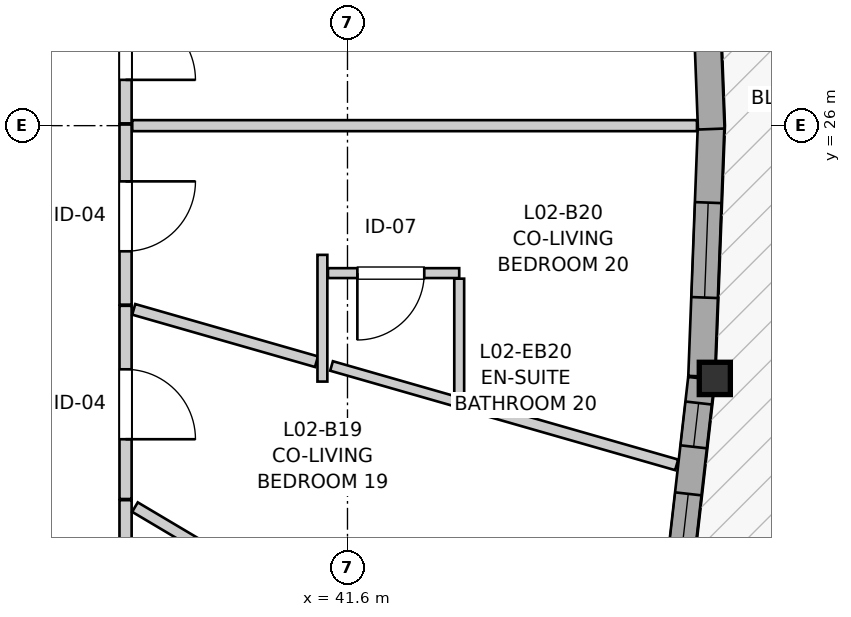
"""IFC4 building model, lengths in metres.
Left out: names, types, materials, properties, quantities, classifications, styles, units other than length and angle.
Written with IfcOpenShell. Run it as: python <this file> out.ifc"""

import sys

from ifc_helpers import new_model, si_unit, direction, frame, frame_2d, origin, origin_2d, place, context, subcontext, project, spatial, rectangle, i_section, extrude, source, transform, mapped, element, fill, save


model = new_model("IFC4")
c1 = context("Model", 3, precision=1e-05, world=origin(), true_north=direction((0.0, 1.0)))
c2 = subcontext(c1, "Body", "Model", "MODEL_VIEW")
j1 = project(units=[si_unit("LENGTHUNIT", "METRE"), si_unit("PLANEANGLEUNIT", "RADIAN")], contexts=[c1])
p1 = place(None, origin())
s1 = spatial("IfcSite", under=j1, at=p1, CompositionType="ELEMENT")
p2 = place(p1, origin())
s2 = spatial("IfcBuilding", under=s1, at=p2, CompositionType="ELEMENT")
p3 = place(p2, frame((0.0, 0.0, 11.0)))
s3 = spatial("IfcBuildingStorey", under=s2, at=p3, CompositionType="ELEMENT", Elevation=11.0)
m1 = source(origin(), c2, "Body", "SweptSolid", [
    extrude(i_section(OverallWidth=0.409, OverallDepth=0.425, WebThickness=0.03, FlangeThickness=0.048, FilletRadius=0.015, at=origin_2d()), origin(), (0.0, 0.0, 1.0), 2.94),
])
p4 = place(p3, frame((46.433, 22.675, 0.0), z_axis=(0.0, 0.0, 1.0), x_axis=(1.0, 0.0, 0.0)))
e1 = element("IfcColumn", 1, at=p4, inside=s3, PredefinedType="PILASTER", context=c2, shape_type="MappedRepresentation", body=[
    mapped(m1, transform((0.0, 0.0, 0.0), x_axis=(1.0, 0.0, 0.0), y_axis=(0.0, 1.0, 0.0), z_axis=(0.0, 0.0, 1.0), scale=1.0)),
])
p5 = place(p3, frame((45.875, 19.331, 0.0), z_axis=(0.0, 0.0, 1.0), x_axis=(0.113329685842, 0.99355743785, 0.0)))
e2 = element("IfcWall", 2, at=p5, inside=s3, PredefinedType="SOLIDWALL", context=c2, shape_type="SweptSolid", body=[
    extrude(rectangle(XDim=3.365, YDim=0.35, at=frame_2d((1.683, 0.0))), origin(), (0.0, 0.0, 1.0), 2.42),
])
p6 = place(p5, frame((0.437, 0.0, 0.82)))
e3 = element("IfcOpeningElement", 3, at=p6, cuts=e2, PredefinedType="OPENING", context=c2, shape_type="SweptSolid", body=[
    extrude(rectangle(XDim=1.4, YDim=1.35, at=frame_2d((0.7, 0.675))), frame((0.0, 0.185, 0.0), z_axis=(0.0, -1.0, 0.0), x_axis=(1.0, 0.0, 0.0)), (0.0, 0.0, 1.0), 0.37),
])
p7 = place(p5, frame((2.459, 0.0, 0.82)))
e4 = element("IfcOpeningElement", 4, at=p7, cuts=e2, PredefinedType="OPENING", context=c2, shape_type="SweptSolid", body=[
    extrude(rectangle(XDim=0.58, YDim=1.35, at=frame_2d((0.29, 0.675))), frame((0.0, 0.185, 0.0), z_axis=(0.0, -1.0, 0.0), x_axis=(1.0, 0.0, 0.0)), (0.0, 0.0, 1.0), 0.37),
])
p8 = place(p3, frame((46.259, 22.701, 0.0), z_axis=(0.0, 0.0, 1.0), x_axis=(0.038015581842, 0.99927714651, 0.0)))
e5 = element("IfcWall", 5, at=p8, inside=s3, PredefinedType="SOLIDWALL", context=c2, shape_type="SweptSolid", body=[
    extrude(rectangle(XDim=3.346, YDim=0.35, at=frame_2d((1.673, 0.0))), origin(), (0.0, 0.0, 1.0), 2.42),
])
p9 = place(p8, frame((1.038, 0.0, 0.82)))
e6 = element("IfcOpeningElement", 6, at=p9, cuts=e5, PredefinedType="OPENING", context=c2, shape_type="SweptSolid", body=[
    extrude(rectangle(XDim=1.25, YDim=1.35, at=frame_2d((0.625, 0.675))), frame((0.0, 0.185, 0.0), z_axis=(0.0, -1.0, 0.0), x_axis=(1.0, 0.0, 0.0)), (0.0, 0.0, 1.0), 0.37),
])
p10 = place(p3, frame((46.386, 25.955, 0.0), z_axis=(0.0, 0.0, 1.0), x_axis=(-0.038063081658, 0.99927533834, 0.0)))
e7 = element("IfcWall", 7, at=p10, inside=s3, PredefinedType="SOLIDWALL", context=c2, shape_type="SweptSolid", body=[
    extrude(rectangle(XDim=3.066, YDim=0.35, at=frame_2d((1.533, 0.0))), origin(), (0.0, 0.0, 1.0), 2.42),
])
p11 = place(p10, frame((1.063, 0.0, 0.82)))
e8 = element("IfcOpeningElement", 8, at=p11, cuts=e7, PredefinedType="OPENING", context=c2, shape_type="SweptSolid", body=[
    extrude(rectangle(XDim=0.95, YDim=1.35, at=frame_2d((0.475, 0.675))), frame((0.0, 0.185, 0.0), z_axis=(0.0, -1.0, 0.0), x_axis=(1.0, 0.0, 0.0)), (0.0, 0.0, 1.0), 0.37),
])
p12 = place(p3, frame((38.68, 21.073, 0.0), z_axis=(0.0, 0.0, 1.0), x_axis=(0.0, -1.0, 0.0)))
e9 = element("IfcWall", 9, at=p12, inside=s3, PredefinedType="PARTITIONING", context=c2, shape_type="SweptSolid", body=[
    extrude(rectangle(XDim=3.589, YDim=0.16, at=frame_2d((1.794, 0.0))), origin(), (0.0, 0.0, 1.0), 2.94),
])
p13 = place(p12, frame((1.333, 0.0, 0.0)))
e10 = element("IfcOpeningElement", 10, at=p13, cuts=e9, PredefinedType="OPENING", context=c2, shape_type="SweptSolid", body=[
    extrude(rectangle(XDim=0.92, YDim=2.1, at=frame_2d((0.46, 1.05))), frame((0.0, 0.09, 0.0), z_axis=(0.0, -1.0, 0.0), x_axis=(1.0, 0.0, 0.0)), (0.0, 0.0, 1.0), 0.18),
])
p14 = place(p3, frame((38.68, 23.63, 0.0), z_axis=(0.0, 0.0, 1.0), x_axis=(0.0, -1.0, 0.0)))
e11 = element("IfcWall", 11, at=p14, inside=s3, PredefinedType="PARTITIONING", context=c2, shape_type="SweptSolid", body=[
    extrude(rectangle(XDim=2.542, YDim=0.16, at=frame_2d((1.271, 0.0))), origin(), (0.0, 0.0, 1.0), 2.94),
])
p15 = place(p14, frame((0.835, 0.0, 0.0)))
e12 = element("IfcOpeningElement", 12, at=p15, cuts=e11, PredefinedType="OPENING", context=c2, shape_type="SweptSolid", body=[
    extrude(rectangle(XDim=0.92, YDim=2.1, at=frame_2d((0.46, 1.05))), frame((0.0, 0.09, 0.0), z_axis=(0.0, -1.0, 0.0), x_axis=(1.0, 0.0, 0.0)), (0.0, 0.0, 1.0), 0.18),
])
p16 = place(p3, frame((38.68, 26.015, 0.0), z_axis=(0.0, 0.0, 1.0), x_axis=(0.0, -1.0, 0.0)))
e13 = element("IfcWall", 13, at=p16, inside=s3, PredefinedType="PARTITIONING", context=c2, shape_type="SweptSolid", body=[
    extrude(rectangle(XDim=2.37, YDim=0.16, at=frame_2d((1.185, 0.0))), origin(), (0.0, 0.0, 1.0), 2.94),
])
p17 = place(p16, frame((0.748, 0.0, 0.0)))
e14 = element("IfcOpeningElement", 14, at=p17, cuts=e13, PredefinedType="OPENING", context=c2, shape_type="SweptSolid", body=[
    extrude(rectangle(XDim=0.92, YDim=2.1, at=frame_2d((0.46, 1.05))), frame((0.0, 0.09, 0.0), z_axis=(0.0, -1.0, 0.0), x_axis=(1.0, 0.0, 0.0)), (0.0, 0.0, 1.0), 0.18),
])
p18 = place(p3, frame((38.68, 28.095, 0.0), z_axis=(0.0, 0.0, 1.0), x_axis=(0.0, -1.0, 0.0)))
e15 = element("IfcWall", 15, at=p18, inside=s3, PredefinedType="PARTITIONING", context=c2, shape_type="SweptSolid", body=[
    extrude(rectangle(XDim=2.065, YDim=0.16, at=frame_2d((1.032, 0.0))), origin(), (0.0, 0.0, 1.0), 2.94),
])
p19 = place(p18, frame((0.573, 0.0, 0.0)))
e16 = element("IfcOpeningElement", 16, at=p19, cuts=e15, PredefinedType="OPENING", context=c2, shape_type="SweptSolid", body=[
    extrude(rectangle(XDim=0.92, YDim=2.1, at=frame_2d((0.46, 1.05))), frame((0.0, 0.09, 0.0), z_axis=(0.0, -1.0, 0.0), x_axis=(1.0, 0.0, 0.0)), (0.0, 0.0, 1.0), 0.18),
])
p20 = place(p3, frame((43.07, 24.06, 0.0), z_axis=(0.0, 0.0, 1.0), x_axis=(-1.0, 0.0, 0.0)))
e17 = element("IfcWall", 17, at=p20, inside=s3, PredefinedType="PARTITIONING", context=c2, shape_type="SweptSolid", body=[
    extrude(rectangle(XDim=1.727, YDim=0.13, at=frame_2d((0.864, 0.0))), origin(), (0.0, 0.0, 1.0), 2.94),
])
p21 = place(p20, frame((0.46, 0.0, 0.0)))
e18 = element("IfcOpeningElement", 18, at=p21, cuts=e17, PredefinedType="OPENING", context=c2, shape_type="SweptSolid", body=[
    extrude(rectangle(XDim=0.88, YDim=2.05, at=frame_2d((0.44, 1.025))), frame((0.0, 0.075, 0.0), z_axis=(0.0, -1.0, 0.0), x_axis=(1.0, 0.0, 0.0)), (0.0, 0.0, 1.0), 0.15),
])
p22 = place(p3, frame((38.768, 26.0, 0.0), z_axis=(0.0, 0.0, 1.0), x_axis=(1.0, 0.0, 0.0)))
e19 = element("IfcWall", 19, at=p22, inside=s3, PredefinedType="PARTITIONING", context=c2, shape_type="SweptSolid", body=[
    extrude(rectangle(XDim=7.43, YDim=0.145, at=frame_2d((3.715, 0.0))), origin(), (0.0, 0.0, 1.0), 2.94),
])
p23 = place(p3, frame((38.804, 20.981, 0.0), z_axis=(0.0, 0.0, 1.0), x_axis=(0.859905944731, -0.510452511225, 0.0)))
e20 = element("IfcWall", 20, at=p23, inside=s3, PredefinedType="PARTITIONING", context=c2, shape_type="SweptSolid", body=[
    extrude(rectangle(XDim=2.943, YDim=0.145, at=frame_2d((1.472, 0.0))), origin(), (0.0, 0.0, 1.0), 2.94),
])
p24 = place(p3, frame((43.055, 22.361, 0.0), z_axis=(0.0, 0.0, 1.0), x_axis=(0.961351316588, -0.275324619486, 0.0)))
e21 = element("IfcWall", 21, at=p24, inside=s3, PredefinedType="PARTITIONING", context=c2, shape_type="SweptSolid", body=[
    extrude(rectangle(XDim=2.992, YDim=0.145, at=frame_2d((1.496, 0.0))), origin(), (0.0, 0.0, 1.0), 2.94),
])
p25 = place(p3, frame((38.788, 23.583, 0.0), z_axis=(0.0, 0.0, 1.0), x_axis=(0.961350656565, -0.275326924078, 0.0)))
e22 = element("IfcWall", 22, at=p25, inside=s3, PredefinedType="PARTITIONING", context=c2, shape_type="SweptSolid", body=[
    extrude(rectangle(XDim=2.501, YDim=0.145, at=frame_2d((1.251, 0.0))), origin(), (0.0, 0.0, 1.0), 2.94),
])
p26 = place(p3, frame((41.39, 22.838, 0.0), z_axis=(0.0, 0.0, 1.0), x_axis=(0.961362810051, -0.275284484582, 0.0)))
e23 = element("IfcWall", 23, at=p26, inside=s3, PredefinedType="PARTITIONING", context=c2, shape_type="SweptSolid", body=[
    extrude(rectangle(XDim=1.717, YDim=0.13, at=frame_2d((0.858, 0.0))), origin(), (0.0, 0.0, 1.0), 2.94),
])
p27 = place(p3, frame((43.07, 22.459, 0.0), z_axis=(0.0, 0.0, 1.0), x_axis=(0.0, 1.0, 0.0)))
e24 = element("IfcWall", 24, at=p27, inside=s3, PredefinedType="PARTITIONING", context=c2, shape_type="SweptSolid", body=[
    extrude(rectangle(XDim=1.528, YDim=0.13, at=frame_2d((0.764, 0.0))), origin(), (0.0, 0.0, 1.0), 2.508),
])
p28 = place(p3, frame((41.27, 22.633, 0.0), z_axis=(0.0, 0.0, 1.0), x_axis=(0.0, 1.0, 0.0)))
e25 = element("IfcWall", 25, at=p28, inside=s3, PredefinedType="PARTITIONING", context=c2, shape_type="SweptSolid", body=[
    extrude(rectangle(XDim=1.667, YDim=0.13, at=frame_2d((0.833, 0.0))), origin(), (0.0, 0.0, 1.0), 2.94),
])
m2 = source(origin(), c2, "Body", "SweptSolid", [
    extrude(rectangle(XDim=1.4, YDim=1.35, at=frame_2d((0.7, 0.675))), frame((0.0, 0.03, 0.0), z_axis=(0.0, -1.0, 0.0), x_axis=(1.0, 0.0, 0.0)), (0.0, 0.0, 1.0), 0.06),
])
p29 = place(p6, origin())
e26 = element("IfcWindow", 26, at=p29, inside=s3, PartitioningType="SINGLE_PANEL", PredefinedType="WINDOW", context=c2, shape_type="MappedRepresentation", body=[
    mapped(m2, transform((0.0, 0.0, 0.0), x_axis=(1.0, 0.0, 0.0), y_axis=(0.0, 1.0, 0.0), z_axis=(0.0, 0.0, 1.0), scale=1.0)),
])
fill(e3, e26)
m3 = source(origin(), c2, "Body", "SweptSolid", [
    extrude(rectangle(XDim=0.58, YDim=1.35, at=frame_2d((0.29, 0.675))), frame((0.0, 0.03, 0.0), z_axis=(0.0, -1.0, 0.0), x_axis=(1.0, 0.0, 0.0)), (0.0, 0.0, 1.0), 0.06),
])
p30 = place(p7, origin())
e27 = element("IfcWindow", 27, at=p30, inside=s3, PartitioningType="SINGLE_PANEL", PredefinedType="WINDOW", context=c2, shape_type="MappedRepresentation", body=[
    mapped(m3, transform((0.0, 0.0, 0.0), x_axis=(1.0, 0.0, 0.0), y_axis=(0.0, 1.0, 0.0), z_axis=(0.0, 0.0, 1.0), scale=1.0)),
])
fill(e4, e27)
m4 = source(origin(), c2, "Body", "SweptSolid", [
    extrude(rectangle(XDim=1.25, YDim=1.35, at=frame_2d((0.625, 0.675))), frame((0.0, 0.03, 0.0), z_axis=(0.0, -1.0, 0.0), x_axis=(1.0, 0.0, 0.0)), (0.0, 0.0, 1.0), 0.06),
])
p31 = place(p9, origin())
e28 = element("IfcWindow", 28, at=p31, inside=s3, PartitioningType="SINGLE_PANEL", PredefinedType="WINDOW", context=c2, shape_type="MappedRepresentation", body=[
    mapped(m4, transform((0.0, 0.0, 0.0), x_axis=(1.0, 0.0, 0.0), y_axis=(0.0, 1.0, 0.0), z_axis=(0.0, 0.0, 1.0), scale=1.0)),
])
fill(e6, e28)
m5 = source(origin(), c2, "Body", "SweptSolid", [
    extrude(rectangle(XDim=0.92, YDim=2.1, at=frame_2d((0.46, 1.05))), frame((0.0, 0.025, 0.0), z_axis=(0.0, -1.0, 0.0), x_axis=(1.0, 0.0, 0.0)), (0.0, 0.0, 1.0), 0.05),
])
p32 = place(p15, origin())
e29 = element("IfcDoor", 29, at=p32, inside=s3, OperationType="SINGLE_SWING_RIGHT", PredefinedType="DOOR", context=c2, shape_type="MappedRepresentation", body=[
    mapped(m5, transform((0.0, 0.0, 0.0), x_axis=(1.0, 0.0, 0.0), y_axis=(0.0, 1.0, 0.0), z_axis=(0.0, 0.0, 1.0), scale=1.0)),
])
fill(e12, e29)
p33 = place(p17, origin())
e30 = element("IfcDoor", 30, at=p33, inside=s3, OperationType="SINGLE_SWING_LEFT", PredefinedType="DOOR", context=c2, shape_type="MappedRepresentation", body=[
    mapped(m5, transform((0.0, 0.0, 0.0), x_axis=(1.0, 0.0, 0.0), y_axis=(0.0, 1.0, 0.0), z_axis=(0.0, 0.0, 1.0), scale=1.0)),
])
fill(e14, e30)
p34 = place(p19, origin())
e31 = element("IfcDoor", 31, at=p34, inside=s3, OperationType="SINGLE_SWING_RIGHT", PredefinedType="DOOR", context=c2, shape_type="MappedRepresentation", body=[
    mapped(m5, transform((0.0, 0.0, 0.0), x_axis=(1.0, 0.0, 0.0), y_axis=(0.0, 1.0, 0.0), z_axis=(0.0, 0.0, 1.0), scale=1.0)),
])
fill(e16, e31)
m6 = source(origin(), c2, "Body", "SweptSolid", [
    extrude(rectangle(XDim=0.88, YDim=2.05, at=frame_2d((0.44, 1.025))), frame((0.0, 0.025, 0.0), z_axis=(0.0, -1.0, 0.0), x_axis=(1.0, 0.0, 0.0)), (0.0, 0.0, 1.0), 0.05),
])
p35 = place(p21, origin())
e32 = element("IfcDoor", 32, at=p35, inside=s3, OperationType="SINGLE_SWING_RIGHT", PredefinedType="DOOR", context=c2, shape_type="MappedRepresentation", body=[
    mapped(m6, transform((0.0, 0.0, 0.0), x_axis=(1.0, 0.0, 0.0), y_axis=(0.0, 1.0, 0.0), z_axis=(0.0, 0.0, 1.0), scale=1.0)),
])
fill(e18, e32)
save(model, sys.argv[1])
